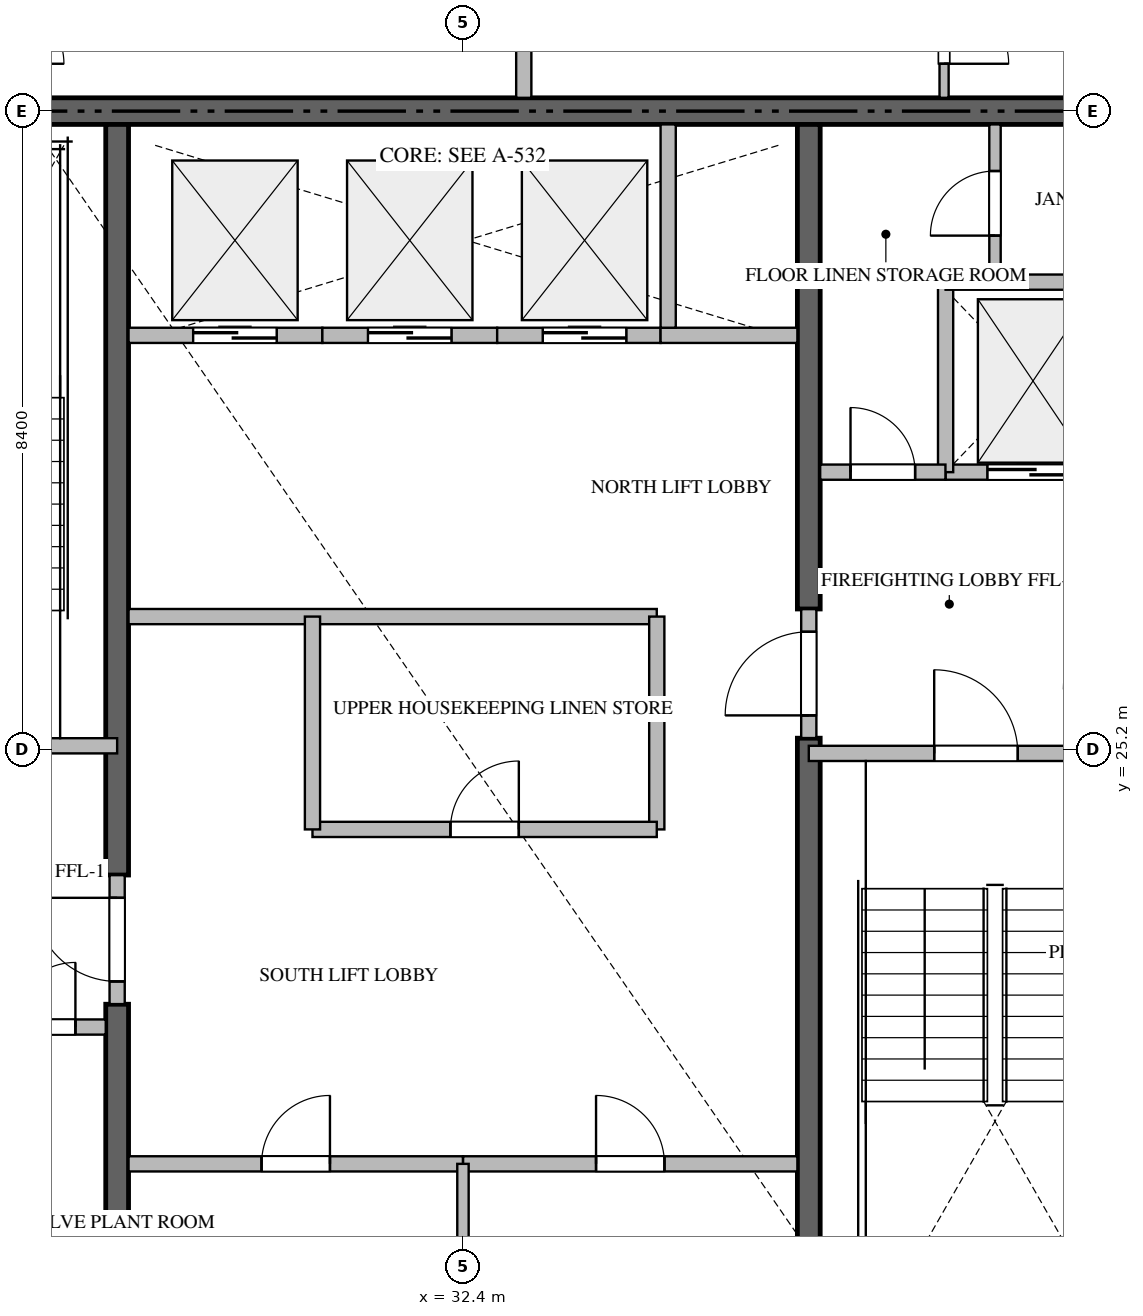
"""IFC4 building model, lengths in metres.
Left out: names, types, materials, properties, quantities, classifications, styles, units other than length and angle.
Written with IfcOpenShell. Run it as: python <this file> out.ifc"""

import sys

from ifc_helpers import new_model, si_unit, direction, frame, frame_2d, origin, place, context, subcontext, project, spatial, rectangle, extrude, source, transform, mapped, element, fill, save


model = new_model("IFC4")
c1 = context("Model", 3, precision=1e-05, world=origin(), true_north=direction((0.0, 1.0)))
c2 = subcontext(c1, "Body", "Model", "MODEL_VIEW")
j1 = project(units=[si_unit("LENGTHUNIT", "METRE"), si_unit("PLANEANGLEUNIT", "RADIAN")], contexts=[c1])
p1 = place(None, origin())
s1 = spatial("IfcSite", under=j1, at=p1, CompositionType="ELEMENT")
p2 = place(p1, origin())
s2 = spatial("IfcBuilding", under=s1, at=p2, CompositionType="ELEMENT")
p3 = place(p2, frame((0.0, 0.0, 338.0)))
s3 = spatial("IfcBuildingStorey", under=s2, at=p3, CompositionType="ELEMENT", Elevation=338.0)
p4 = place(p3, frame((41.4, 33.6, -0.44), z_axis=(0.0, 0.0, 1.0), x_axis=(-1.0, 0.0, 0.0)))
e1 = element("IfcWall", 1, at=p4, inside=s3, PredefinedType="SHEAR", context=c2, shape_type="SweptSolid", body=[
    extrude(rectangle(XDim=18.0, YDim=0.35, at=frame_2d((9.0, 0.0))), origin(), (0.0, 0.0, 1.0), 4.228),
])
p5 = place(p3, frame((27.85, 16.975, -0.44), z_axis=(0.0, 0.0, 1.0), x_axis=(0.0, 1.0, 0.0)))
e2 = element("IfcWall", 2, at=p5, inside=s3, PredefinedType="SHEAR", context=c2, shape_type="SweptSolid", body=[
    extrude(rectangle(XDim=4.875, YDim=0.3, at=frame_2d((2.438, 0.0))), origin(), (0.0, 0.0, 1.0), 4.228),
])
p6 = place(p3, frame((27.85, 23.55, -0.44), z_axis=(0.0, 0.0, 1.0), x_axis=(0.0, 1.0, 0.0)))
e3 = element("IfcWall", 3, at=p6, inside=s3, PredefinedType="SHEAR", context=c2, shape_type="SweptSolid", body=[
    extrude(rectangle(XDim=9.875, YDim=0.3, at=frame_2d((4.938, 0.0))), origin(), (0.0, 0.0, 1.0), 4.228),
])
p7 = place(p3, frame((36.95, 16.975, -0.44), z_axis=(0.0, 0.0, 1.0), x_axis=(0.0, 1.0, 0.0)))
e4 = element("IfcWall", 4, at=p7, inside=s3, PredefinedType="SHEAR", context=c2, shape_type="SweptSolid", body=[
    extrude(rectangle(XDim=8.375, YDim=0.3, at=frame_2d((4.188, 0.0))), origin(), (0.0, 0.0, 1.0), 4.228),
])
p8 = place(p3, frame((36.95, 27.05, -0.44), z_axis=(0.0, 0.0, 1.0), x_axis=(0.0, 1.0, 0.0)))
e5 = element("IfcWall", 5, at=p8, inside=s3, PredefinedType="SHEAR", context=c2, shape_type="SweptSolid", body=[
    extrude(rectangle(XDim=6.375, YDim=0.3, at=frame_2d((3.188, 0.0))), origin(), (0.0, 0.0, 1.0), 4.228),
])
p9 = place(p3, frame((23.4, 25.25, 0.0), z_axis=(0.0, 0.0, 1.0), x_axis=(1.0, 0.0, 0.0)))
e6 = element("IfcWall", 6, at=p9, inside=s3, PredefinedType="STANDARD", context=c2, shape_type="SweptSolid", body=[
    extrude(rectangle(XDim=4.45, YDim=0.2, at=frame_2d((2.225, 0.0))), origin(), (0.0, 0.0, 1.0), 3.79),
])
p10 = place(p9, frame((1.65, 0.0, 0.0)))
e7 = element("IfcOpeningElement", 7, at=p10, cuts=e6, PredefinedType="OPENING", context=c2, shape_type="SweptSolid", body=[
    extrude(rectangle(XDim=1.1, YDim=2.15, at=frame_2d((0.55, 1.075))), frame((0.0, 0.11, 0.0), z_axis=(0.0, -1.0, 0.0), x_axis=(1.0, 0.0, 0.0)), (0.0, 0.0, 1.0), 0.22),
])
p11 = place(p3, frame((36.95, 25.15, 0.0), z_axis=(0.0, 0.0, 1.0), x_axis=(1.0, 0.0, 0.0)))
e8 = element("IfcWall", 8, at=p11, inside=s3, PredefinedType="STANDARD", context=c2, shape_type="SweptSolid", body=[
    extrude(rectangle(XDim=4.45, YDim=0.2, at=frame_2d((2.225, 0.0))), origin(), (0.0, 0.0, 1.0), 3.79),
])
p12 = place(p11, frame((1.65, 0.0, 0.0)))
e9 = element("IfcOpeningElement", 9, at=p12, cuts=e8, PredefinedType="OPENING", context=c2, shape_type="SweptSolid", body=[
    extrude(rectangle(XDim=1.1, YDim=2.15, at=frame_2d((0.55, 1.075))), frame((0.0, 0.11, 0.0), z_axis=(0.0, -1.0, 0.0), x_axis=(1.0, 0.0, 0.0)), (0.0, 0.0, 1.0), 0.22),
])
p13 = place(p3, frame((38.75, 28.85, 0.0), z_axis=(0.0, 0.0, 1.0), x_axis=(1.0, 0.0, 0.0)))
e10 = element("IfcWall", 10, at=p13, inside=s3, PredefinedType="STANDARD", context=c2, shape_type="SweptSolid", body=[
    extrude(rectangle(XDim=2.475, YDim=0.2, at=frame_2d((1.238, 0.0))), origin(), (0.0, 0.0, 1.0), 3.79),
])
p14 = place(p13, frame((0.55, 0.0, 0.0)))
e11 = element("IfcOpeningElement", 11, at=p14, cuts=e10, PredefinedType="OPENING", context=c2, shape_type="SweptSolid", body=[
    extrude(rectangle(XDim=1.2, YDim=2.2, at=frame_2d((0.6, 1.1))), frame((0.0, 0.11, 0.0), z_axis=(0.0, -1.0, 0.0), x_axis=(1.0, 0.0, 0.0)), (0.0, 0.0, 1.0), 0.22),
])
p15 = place(p3, frame((28.0, 30.65, 0.0), z_axis=(0.0, 0.0, 1.0), x_axis=(1.0, 0.0, 0.0)))
e12 = element("IfcWall", 12, at=p15, inside=s3, PredefinedType="STANDARD", context=c2, shape_type="SweptSolid", body=[
    extrude(rectangle(XDim=2.55, YDim=0.2, at=frame_2d((1.275, 0.0))), origin(), (0.0, 0.0, 1.0), 3.79),
])
p16 = place(p15, frame((0.85, 0.0, 0.0)))
e13 = element("IfcOpeningElement", 13, at=p16, cuts=e12, PredefinedType="OPENING", context=c2, shape_type="SweptSolid", body=[
    extrude(rectangle(XDim=1.1, YDim=2.2, at=frame_2d((0.55, 1.1))), frame((0.0, 0.11, 0.0), z_axis=(0.0, -1.0, 0.0), x_axis=(1.0, 0.0, 0.0)), (0.0, 0.0, 1.0), 0.22),
])
p17 = place(p3, frame((30.55, 30.65, 0.0), z_axis=(0.0, 0.0, 1.0), x_axis=(1.0, 0.0, 0.0)))
e14 = element("IfcWall", 14, at=p17, inside=s3, PredefinedType="STANDARD", context=c2, shape_type="SweptSolid", body=[
    extrude(rectangle(XDim=2.3, YDim=0.2, at=frame_2d((1.15, 0.0))), origin(), (0.0, 0.0, 1.0), 3.79),
])
p18 = place(p17, frame((0.6, 0.0, 0.0)))
e15 = element("IfcOpeningElement", 15, at=p18, cuts=e14, PredefinedType="OPENING", context=c2, shape_type="SweptSolid", body=[
    extrude(rectangle(XDim=1.1, YDim=2.2, at=frame_2d((0.55, 1.1))), frame((0.0, 0.11, 0.0), z_axis=(0.0, -1.0, 0.0), x_axis=(1.0, 0.0, 0.0)), (0.0, 0.0, 1.0), 0.22),
])
p19 = place(p3, frame((32.85, 30.65, 0.0), z_axis=(0.0, 0.0, 1.0), x_axis=(1.0, 0.0, 0.0)))
e16 = element("IfcWall", 16, at=p19, inside=s3, PredefinedType="STANDARD", context=c2, shape_type="SweptSolid", body=[
    extrude(rectangle(XDim=2.15, YDim=0.2, at=frame_2d((1.075, 0.0))), origin(), (0.0, 0.0, 1.0), 3.79),
])
p20 = place(p19, frame((0.6, 0.0, 0.0)))
e17 = element("IfcOpeningElement", 17, at=p20, cuts=e16, PredefinedType="OPENING", context=c2, shape_type="SweptSolid", body=[
    extrude(rectangle(XDim=1.1, YDim=2.2, at=frame_2d((0.55, 1.1))), frame((0.0, 0.11, 0.0), z_axis=(0.0, -1.0, 0.0), x_axis=(1.0, 0.0, 0.0)), (0.0, 0.0, 1.0), 0.22),
])
p21 = place(p3, frame((35.0, 30.65, 0.0), z_axis=(0.0, 0.0, 1.0), x_axis=(1.0, 0.0, 0.0)))
e18 = element("IfcWall", 18, at=p21, inside=s3, PredefinedType="STANDARD", context=c2, shape_type="SweptSolid", body=[
    extrude(rectangle(XDim=1.8, YDim=0.2, at=frame_2d((0.9, 0.0))), origin(), (0.0, 0.0, 1.0), 3.79),
])
p22 = place(p3, frame((35.1, 30.75, 0.0), z_axis=(0.0, 0.0, 1.0), x_axis=(0.0, 1.0, 0.0)))
e19 = element("IfcWall", 19, at=p22, inside=s3, PredefinedType="STANDARD", context=c2, shape_type="SweptSolid", body=[
    extrude(rectangle(XDim=2.675, YDim=0.2, at=frame_2d((1.337, 0.0))), origin(), (0.0, 0.0, 1.0), 3.79),
])
p23 = place(p3, frame((26.052, 21.55, 0.0), z_axis=(0.0, 0.0, 1.0), x_axis=(1.0, 0.0, 0.0)))
e20 = element("IfcWall", 20, at=p23, inside=s3, PredefinedType="STANDARD", context=c2, shape_type="SweptSolid", body=[
    extrude(rectangle(XDim=1.648, YDim=0.2, at=frame_2d((0.824, 0.0))), origin(), (0.0, 0.0, 1.0), 3.79),
])
p24 = place(p23, frame((0.399, 0.0, 0.0)))
e21 = element("IfcOpeningElement", 21, at=p24, cuts=e20, PredefinedType="OPENING", context=c2, shape_type="SweptSolid", body=[
    extrude(rectangle(XDim=0.85, YDim=2.1, at=frame_2d((0.425, 1.05))), frame((0.0, 0.11, 0.0), z_axis=(0.0, -1.0, 0.0), x_axis=(1.0, 0.0, 0.0)), (0.0, 0.0, 1.0), 0.22),
])
p25 = place(p3, frame((38.75, 28.85, 0.0), z_axis=(0.0, 0.0, 1.0), x_axis=(0.0, 1.0, 0.0)))
e22 = element("IfcWall", 22, at=p25, inside=s3, PredefinedType="STANDARD", context=c2, shape_type="SweptSolid", body=[
    extrude(rectangle(XDim=2.5, YDim=0.2, at=frame_2d((1.25, 0.0))), origin(), (0.0, 0.0, 1.0), 3.79),
])
p26 = place(p3, frame((38.75, 31.35, 0.0), z_axis=(0.0, 0.0, 1.0), x_axis=(1.0, 0.0, 0.0)))
e23 = element("IfcWall", 23, at=p26, inside=s3, PredefinedType="STANDARD", context=c2, shape_type="SweptSolid", body=[
    extrude(rectangle(XDim=2.475, YDim=0.2, at=frame_2d((1.238, 0.0))), origin(), (0.0, 0.0, 1.0), 3.79),
])
p27 = place(p3, frame((37.1, 28.85, 0.0), z_axis=(0.0, 0.0, 1.0), x_axis=(1.0, 0.0, 0.0)))
e24 = element("IfcWall", 24, at=p27, inside=s3, PredefinedType="STANDARD", context=c2, shape_type="SweptSolid", body=[
    extrude(rectangle(XDim=1.648, YDim=0.2, at=frame_2d((0.824, 0.0))), origin(), (0.0, 0.0, 1.0), 3.79),
])
p28 = place(p27, frame((0.399, 0.0, 0.0)))
e25 = element("IfcOpeningElement", 25, at=p28, cuts=e24, PredefinedType="OPENING", context=c2, shape_type="SweptSolid", body=[
    extrude(rectangle(XDim=0.85, YDim=2.1, at=frame_2d((0.425, 1.05))), frame((0.0, 0.11, 0.0), z_axis=(0.0, -1.0, 0.0), x_axis=(1.0, 0.0, 0.0)), (0.0, 0.0, 1.0), 0.22),
])
p29 = place(p3, frame((27.85, 21.852, 0.0), z_axis=(0.0, 0.0, 1.0), x_axis=(0.0, 1.0, 0.0)))
e26 = element("IfcWall", 26, at=p29, inside=s3, PredefinedType="STANDARD", context=c2, shape_type="SweptSolid", body=[
    extrude(rectangle(XDim=1.696, YDim=0.2, at=frame_2d((0.848, 0.0))), origin(), (0.0, 0.0, 1.0), 3.79),
])
p30 = place(p29, frame((0.298, 0.0, 0.0)))
e27 = element("IfcOpeningElement", 27, at=p30, cuts=e26, PredefinedType="OPENING", context=c2, shape_type="SweptSolid", body=[
    extrude(rectangle(XDim=1.1, YDim=2.15, at=frame_2d((0.55, 1.075))), frame((0.0, 0.11, 0.0), z_axis=(0.0, -1.0, 0.0), x_axis=(1.0, 0.0, 0.0)), (0.0, 0.0, 1.0), 0.22),
])
p31 = place(p3, frame((36.95, 25.352, 0.0), z_axis=(0.0, 0.0, 1.0), x_axis=(0.0, 1.0, 0.0)))
e28 = element("IfcWall", 28, at=p31, inside=s3, PredefinedType="STANDARD", context=c2, shape_type="SweptSolid", body=[
    extrude(rectangle(XDim=1.696, YDim=0.2, at=frame_2d((0.848, 0.0))), origin(), (0.0, 0.0, 1.0), 3.79),
])
p32 = place(p31, frame((0.298, 0.0, 0.0)))
e29 = element("IfcOpeningElement", 29, at=p32, cuts=e28, PredefinedType="OPENING", context=c2, shape_type="SweptSolid", body=[
    extrude(rectangle(XDim=1.1, YDim=2.15, at=frame_2d((0.55, 1.075))), frame((0.0, 0.11, 0.0), z_axis=(0.0, -1.0, 0.0), x_axis=(1.0, 0.0, 0.0)), (0.0, 0.0, 1.0), 0.22),
])
p33 = place(p3, frame((39.4, 31.35, 0.0), z_axis=(0.0, 0.0, 1.0), x_axis=(0.0, 1.0, 0.0)))
e30 = element("IfcWall", 30, at=p33, inside=s3, PredefinedType="PARTITIONING", context=c2, shape_type="SweptSolid", body=[
    extrude(rectangle(XDim=2.075, YDim=0.15, at=frame_2d((1.038, 0.0))), origin(), (0.0, 0.0, 1.0), 3.79),
])
p34 = place(p33, frame((0.612, 0.0, 0.0)))
e31 = element("IfcOpeningElement", 31, at=p34, cuts=e30, PredefinedType="OPENING", context=c2, shape_type="SweptSolid", body=[
    extrude(rectangle(XDim=0.85, YDim=2.1, at=frame_2d((0.425, 1.05))), frame((0.0, 0.085, 0.0), z_axis=(0.0, -1.0, 0.0), x_axis=(1.0, 0.0, 0.0)), (0.0, 0.0, 1.0), 0.17),
])
p35 = place(p3, frame((28.0, 19.75, 0.0), z_axis=(0.0, 0.0, 1.0), x_axis=(1.0, 0.0, 0.0)))
e32 = element("IfcWall", 32, at=p35, inside=s3, PredefinedType="STANDARD", context=c2, shape_type="SweptSolid", body=[
    extrude(rectangle(XDim=4.4, YDim=0.2, at=frame_2d((2.2, 0.0))), origin(), (0.0, 0.0, 1.0), 3.79),
])
p36 = place(p35, frame((1.75, 0.0, 0.0)))
e33 = element("IfcOpeningElement", 33, at=p36, cuts=e32, PredefinedType="OPENING", context=c2, shape_type="SweptSolid", body=[
    extrude(rectangle(XDim=0.9, YDim=2.1, at=frame_2d((0.45, 1.05))), frame((0.0, 0.11, 0.0), z_axis=(0.0, -1.0, 0.0), x_axis=(1.0, 0.0, 0.0)), (0.0, 0.0, 1.0), 0.22),
])
p37 = place(p3, frame((32.402, 19.75, 0.0), z_axis=(0.0, 0.0, 1.0), x_axis=(1.0, 0.0, 0.0)))
e34 = element("IfcWall", 34, at=p37, inside=s3, PredefinedType="STANDARD", context=c2, shape_type="SweptSolid", body=[
    extrude(rectangle(XDim=4.398, YDim=0.2, at=frame_2d((2.199, 0.0))), origin(), (0.0, 0.0, 1.0), 3.79),
])
p38 = place(p37, frame((1.749, 0.0, 0.0)))
e35 = element("IfcOpeningElement", 35, at=p38, cuts=e34, PredefinedType="OPENING", context=c2, shape_type="SweptSolid", body=[
    extrude(rectangle(XDim=0.9, YDim=2.1, at=frame_2d((0.45, 1.05))), frame((0.0, 0.11, 0.0), z_axis=(0.0, -1.0, 0.0), x_axis=(1.0, 0.0, 0.0)), (0.0, 0.0, 1.0), 0.22),
])
p39 = place(p3, frame((32.4, 17.02, 0.0), z_axis=(0.0, 0.0, 1.0), x_axis=(0.0, 1.0, 0.0)))
e36 = element("IfcWall", 36, at=p39, inside=s3, PredefinedType="PARTITIONING", context=c2, shape_type="SweptSolid", body=[
    extrude(rectangle(XDim=2.73, YDim=0.15, at=frame_2d((1.365, 0.0))), origin(), (0.0, 0.0, 1.0), 3.79),
])
p40 = place(p3, frame((28.0, 26.95, 0.0), z_axis=(0.0, 0.0, 1.0), x_axis=(1.0, 0.0, 0.0)))
e37 = element("IfcWall", 37, at=p40, inside=s3, PredefinedType="STANDARD", context=c2, shape_type="SweptSolid", body=[
    extrude(rectangle(XDim=6.95, YDim=0.2, at=frame_2d((3.475, 0.0))), origin(), (0.0, 0.0, 1.0), 3.79),
])
p41 = place(p3, frame((34.95, 24.15, 0.0), z_axis=(0.0, 0.0, 1.0), x_axis=(0.0, 1.0, 0.0)))
e38 = element("IfcWall", 38, at=p41, inside=s3, PredefinedType="STANDARD", context=c2, shape_type="SweptSolid", body=[
    extrude(rectangle(XDim=2.8, YDim=0.2, at=frame_2d((1.4, 0.0))), origin(), (0.0, 0.0, 1.0), 3.79),
])
p42 = place(p3, frame((30.42, 24.15, 0.0), z_axis=(0.0, 0.0, 1.0), x_axis=(1.0, 0.0, 0.0)))
e39 = element("IfcWall", 39, at=p42, inside=s3, PredefinedType="STANDARD", context=c2, shape_type="SweptSolid", body=[
    extrude(rectangle(XDim=4.53, YDim=0.2, at=frame_2d((2.265, 0.0))), origin(), (0.0, 0.0, 1.0), 3.79),
])
p43 = place(p42, frame((1.815, 0.0, 0.0)))
e40 = element("IfcOpeningElement", 40, at=p43, cuts=e39, PredefinedType="OPENING", context=c2, shape_type="SweptSolid", body=[
    extrude(rectangle(XDim=0.9, YDim=2.1, at=frame_2d((0.45, 1.05))), frame((0.0, 0.11, 0.0), z_axis=(0.0, -1.0, 0.0), x_axis=(1.0, 0.0, 0.0)), (0.0, 0.0, 1.0), 0.22),
])
p44 = place(p3, frame((30.42, 24.15, 0.0), z_axis=(0.0, 0.0, 1.0), x_axis=(0.0, 1.0, 0.0)))
e41 = element("IfcWall", 41, at=p44, inside=s3, PredefinedType="STANDARD", context=c2, shape_type="SweptSolid", body=[
    extrude(rectangle(XDim=2.8, YDim=0.2, at=frame_2d((1.4, 0.0))), origin(), (0.0, 0.0, 1.0), 3.79),
])
p45 = place(p3, frame((33.2, 33.775, 0.0), z_axis=(0.0, 0.0, 1.0), x_axis=(0.0, 1.0, 0.0)))
e42 = element("IfcWall", 42, at=p45, inside=s3, PredefinedType="PARTITIONING", context=c2, shape_type="SweptSolid", body=[
    extrude(rectangle(XDim=12.543, YDim=0.2, at=frame_2d((6.271, 0.0))), origin(), (0.0, 0.0, 1.0), 3.79),
])
p46 = place(p3, frame((38.73, 35.648, 0.0), z_axis=(0.0, 0.0, 1.0), x_axis=(0.0, -1.0, 0.0)))
e43 = element("IfcWall", 43, at=p46, inside=s3, PredefinedType="PARTITIONING", context=c2, shape_type="SweptSolid", body=[
    extrude(rectangle(XDim=1.873, YDim=0.12, at=frame_2d((0.937, 0.0))), origin(), (0.0, 0.0, 1.0), 3.79),
])
p47 = place(p46, frame((0.575, 0.0, 0.0)))
e44 = element("IfcOpeningElement", 44, at=p47, cuts=e43, PredefinedType="OPENING", context=c2, shape_type="SweptSolid", body=[
    extrude(rectangle(XDim=0.85, YDim=2.1, at=frame_2d((0.425, 1.05))), frame((0.0, 0.07, 0.0), z_axis=(0.0, -1.0, 0.0), x_axis=(1.0, 0.0, 0.0)), (0.0, 0.0, 1.0), 0.14),
])
m1 = source(origin(), c2, "Body", "SweptSolid", [
    extrude(rectangle(XDim=1.1, YDim=2.15, at=frame_2d((0.55, 1.075))), frame((0.0, 0.025, 0.0), z_axis=(0.0, -1.0, 0.0), x_axis=(1.0, 0.0, 0.0)), (0.0, 0.0, 1.0), 0.05),
])
p48 = place(p12, origin())
e45 = element("IfcDoor", 45, at=p48, inside=s3, OperationType="SINGLE_SWING_LEFT", PredefinedType="DOOR", context=c2, shape_type="MappedRepresentation", body=[
    mapped(m1, transform((0.0, 0.0, 0.0), scale=1.0)),
])
fill(e9, e45)
m2 = source(origin(), c2, "Body", "SweptSolid", [
    extrude(rectangle(XDim=1.2, YDim=2.2, at=frame_2d((0.6, 1.1))), frame((0.0, 0.025, 0.0), z_axis=(0.0, -1.0, 0.0), x_axis=(1.0, 0.0, 0.0)), (0.0, 0.0, 1.0), 0.05),
])
p49 = place(p14, origin())
e46 = element("IfcDoor", 46, at=p49, inside=s3, OperationType="DOUBLE_DOOR_SLIDING", PredefinedType="DOOR", context=c2, shape_type="MappedRepresentation", body=[
    mapped(m2, transform((0.0, 0.0, 0.0), scale=1.0)),
])
fill(e11, e46)
m3 = source(origin(), c2, "Body", "SweptSolid", [
    extrude(rectangle(XDim=1.1, YDim=2.2, at=frame_2d((0.55, 1.1))), frame((0.0, 0.025, 0.0), z_axis=(0.0, -1.0, 0.0), x_axis=(1.0, 0.0, 0.0)), (0.0, 0.0, 1.0), 0.05),
])
p50 = place(p16, origin())
e47 = element("IfcDoor", 47, at=p50, inside=s3, OperationType="DOUBLE_DOOR_SLIDING", PredefinedType="DOOR", context=c2, shape_type="MappedRepresentation", body=[
    mapped(m3, transform((0.0, 0.0, 0.0), scale=1.0)),
])
fill(e13, e47)
p51 = place(p18, origin())
e48 = element("IfcDoor", 48, at=p51, inside=s3, OperationType="DOUBLE_DOOR_SLIDING", PredefinedType="DOOR", context=c2, shape_type="MappedRepresentation", body=[
    mapped(m3, transform((0.0, 0.0, 0.0), scale=1.0)),
])
fill(e15, e48)
p52 = place(p20, origin())
e49 = element("IfcDoor", 49, at=p52, inside=s3, OperationType="DOUBLE_DOOR_SLIDING", PredefinedType="DOOR", context=c2, shape_type="MappedRepresentation", body=[
    mapped(m3, transform((0.0, 0.0, 0.0), scale=1.0)),
])
fill(e17, e49)
m4 = source(origin(), c2, "Body", "SweptSolid", [
    extrude(rectangle(XDim=0.85, YDim=2.1, at=frame_2d((0.425, 1.05))), frame((0.0, 0.025, 0.0), z_axis=(0.0, -1.0, 0.0), x_axis=(1.0, 0.0, 0.0)), (0.0, 0.0, 1.0), 0.05),
])
p53 = place(p24, origin())
e50 = element("IfcDoor", 50, at=p53, inside=s3, OperationType="SINGLE_SWING_RIGHT", PredefinedType="DOOR", context=c2, shape_type="MappedRepresentation", body=[
    mapped(m4, transform((0.0, 0.0, 0.0), scale=1.0)),
])
fill(e21, e50)
p54 = place(p28, origin())
e51 = element("IfcDoor", 51, at=p54, inside=s3, OperationType="SINGLE_SWING_LEFT", PredefinedType="DOOR", context=c2, shape_type="MappedRepresentation", body=[
    mapped(m4, transform((0.0, 0.0, 0.0), scale=1.0)),
])
fill(e25, e51)
p55 = place(p30, origin())
e52 = element("IfcDoor", 52, at=p55, inside=s3, OperationType="SINGLE_SWING_RIGHT", PredefinedType="DOOR", context=c2, shape_type="MappedRepresentation", body=[
    mapped(m1, transform((0.0, 0.0, 0.0), scale=1.0)),
])
fill(e27, e52)
p56 = place(p32, origin())
e53 = element("IfcDoor", 53, at=p56, inside=s3, OperationType="SINGLE_SWING_LEFT", PredefinedType="DOOR", context=c2, shape_type="MappedRepresentation", body=[
    mapped(m1, transform((0.0, 0.0, 0.0), scale=1.0)),
])
fill(e29, e53)
p57 = place(p34, origin())
e54 = element("IfcDoor", 54, at=p57, inside=s3, OperationType="SINGLE_SWING_LEFT", PredefinedType="DOOR", context=c2, shape_type="MappedRepresentation", body=[
    mapped(m4, transform((0.0, 0.0, 0.0), scale=1.0)),
])
fill(e31, e54)
m5 = source(origin(), c2, "Body", "SweptSolid", [
    extrude(rectangle(XDim=0.9, YDim=2.1, at=frame_2d((0.45, 1.05))), frame((0.0, 0.025, 0.0), z_axis=(0.0, -1.0, 0.0), x_axis=(1.0, 0.0, 0.0)), (0.0, 0.0, 1.0), 0.05),
])
p58 = place(p36, origin())
e55 = element("IfcDoor", 55, at=p58, inside=s3, OperationType="SINGLE_SWING_RIGHT", PredefinedType="DOOR", context=c2, shape_type="MappedRepresentation", body=[
    mapped(m5, transform((0.0, 0.0, 0.0), scale=1.0)),
])
fill(e33, e55)
p59 = place(p38, origin())
e56 = element("IfcDoor", 56, at=p59, inside=s3, OperationType="SINGLE_SWING_LEFT", PredefinedType="DOOR", context=c2, shape_type="MappedRepresentation", body=[
    mapped(m5, transform((0.0, 0.0, 0.0), scale=1.0)),
])
fill(e35, e56)
p60 = place(p43, origin())
e57 = element("IfcDoor", 57, at=p60, inside=s3, OperationType="SINGLE_SWING_RIGHT", PredefinedType="DOOR", context=c2, shape_type="MappedRepresentation", body=[
    mapped(m5, transform((0.0, 0.0, 0.0), scale=1.0)),
])
fill(e40, e57)
p61 = place(p47, origin())
e58 = element("IfcDoor", 58, at=p61, inside=s3, OperationType="SINGLE_SWING_RIGHT", PredefinedType="DOOR", context=c2, shape_type="MappedRepresentation", body=[
    mapped(m4, transform((0.0, 0.0, 0.0), scale=1.0)),
])
fill(e44, e58)
save(model, sys.argv[1])
